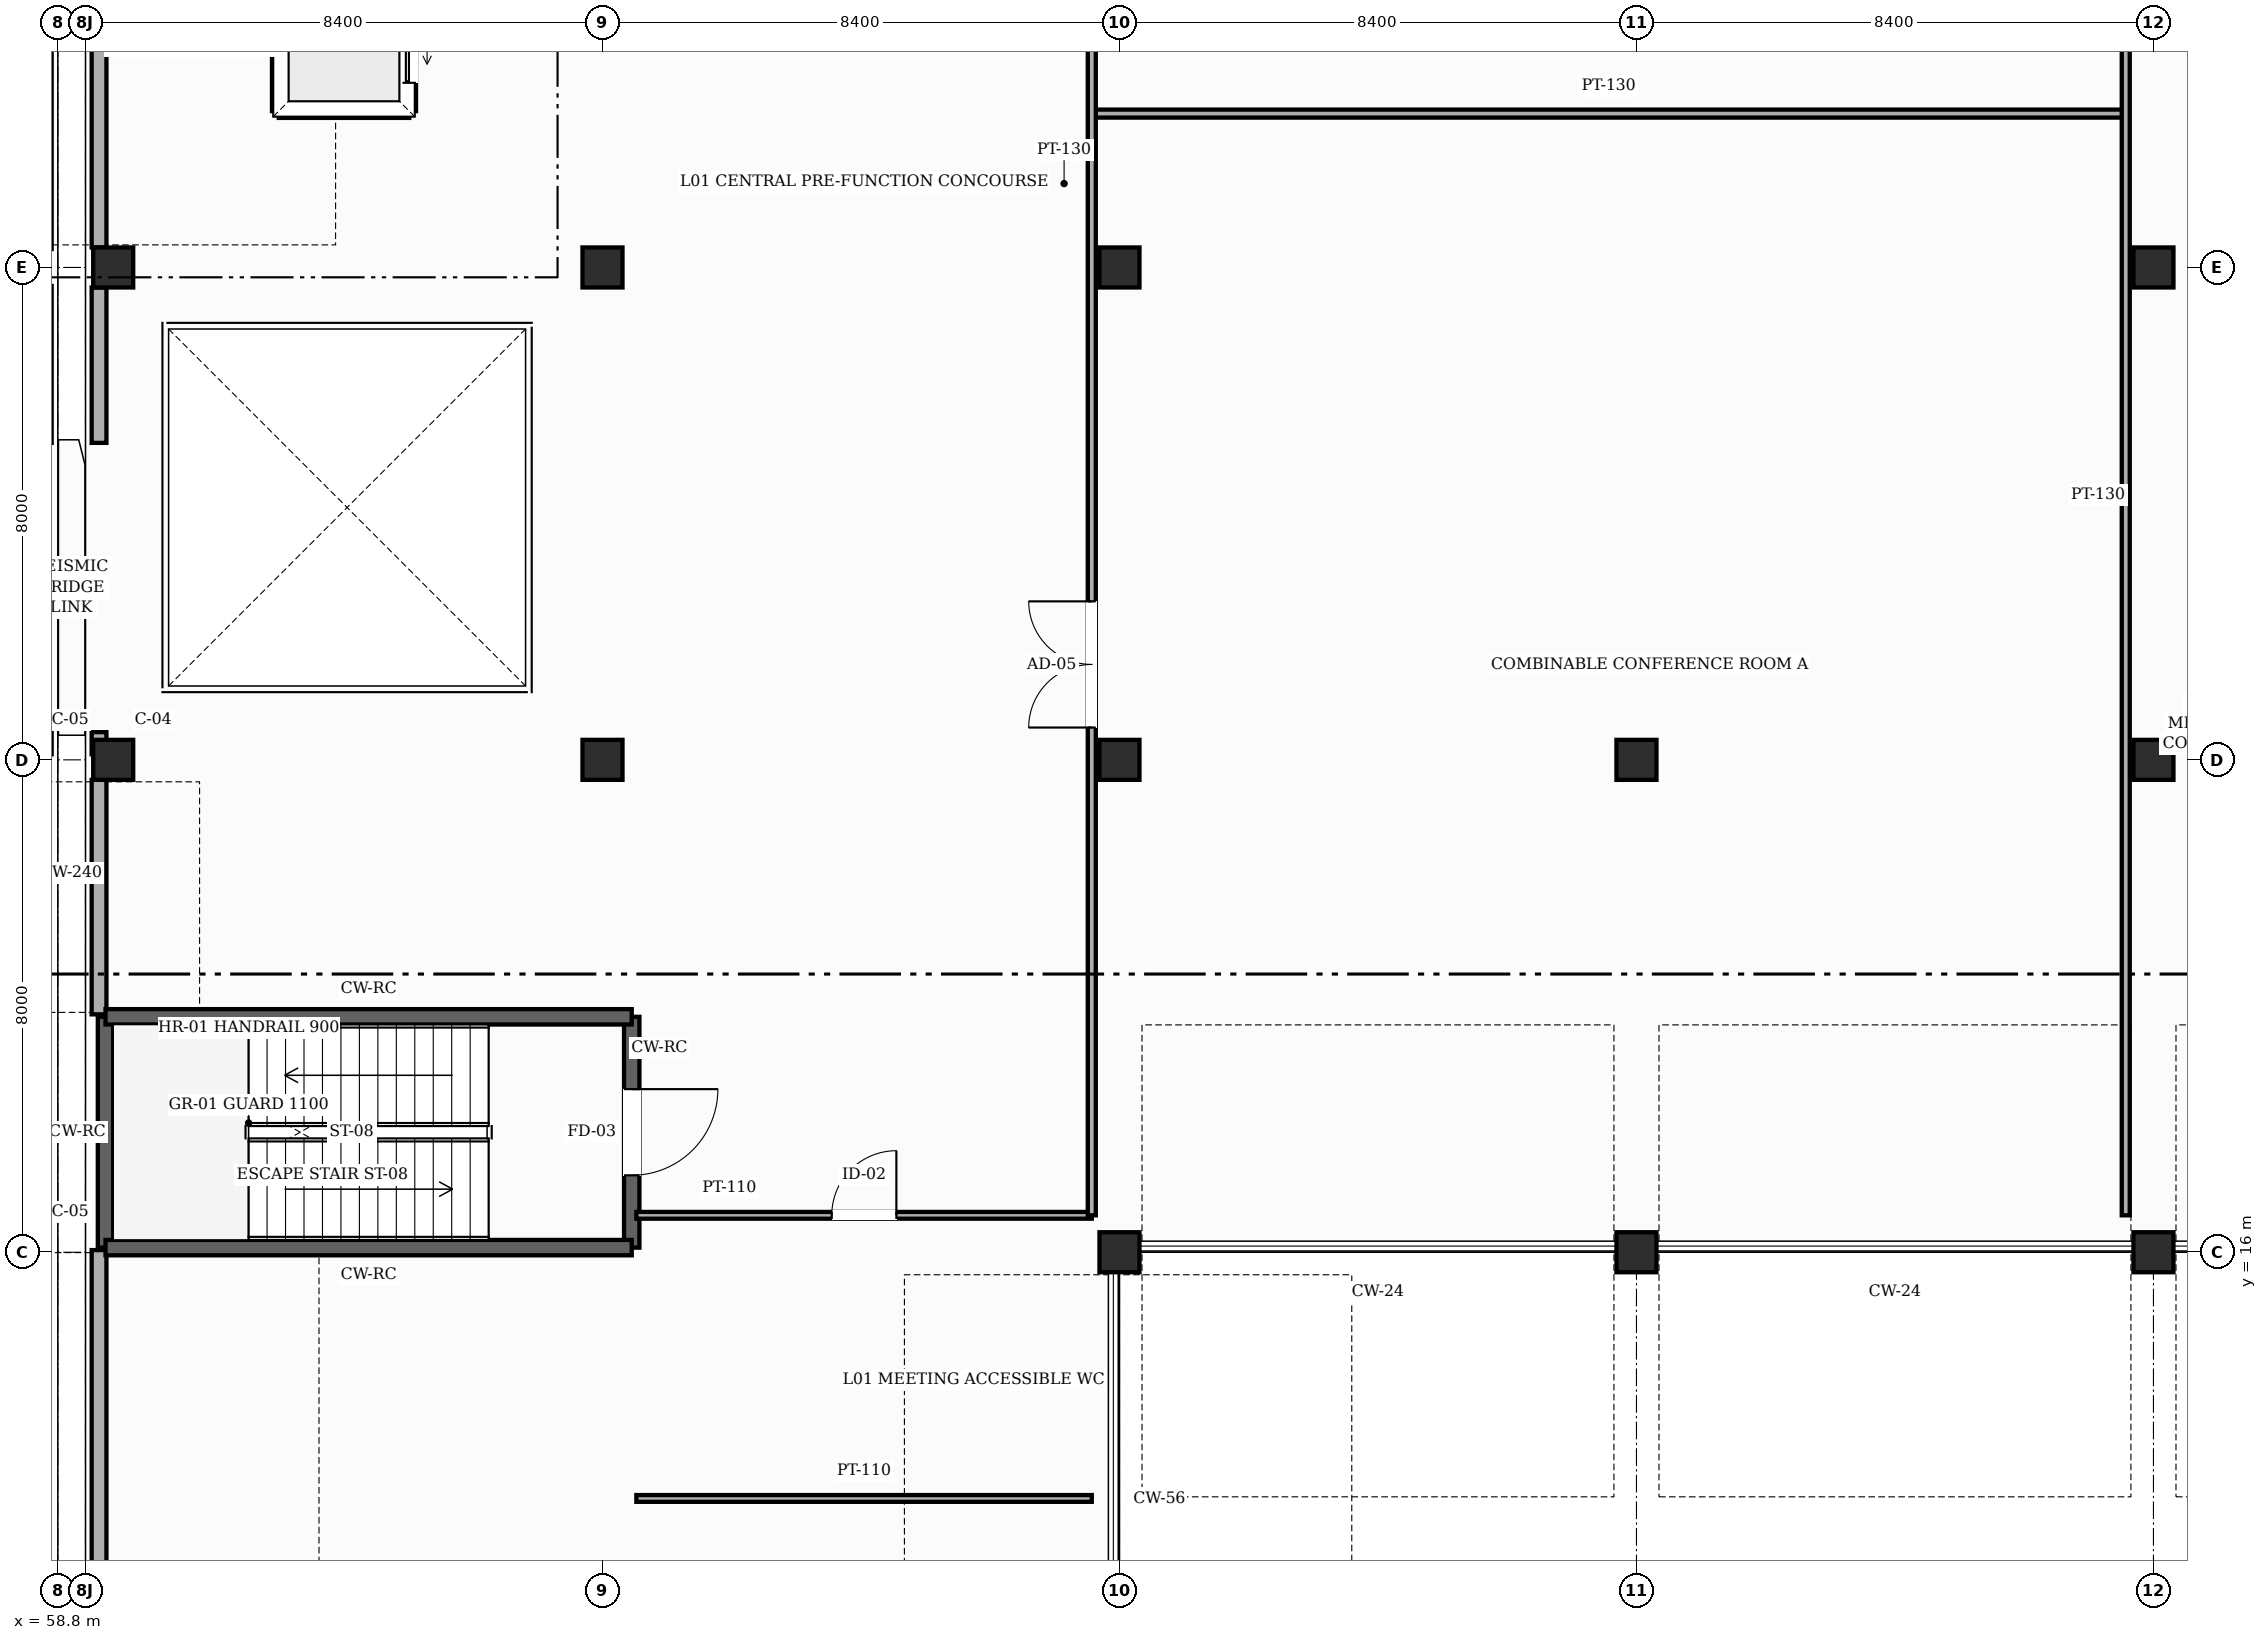
"""IFC4 building model, lengths in metres.
Left out: names, types, materials, properties, quantities, classifications, styles, units other than length and angle.
Written with IfcOpenShell. Run it as: python <this file> out.ifc"""

import sys

from ifc_helpers import new_model, si_unit, direction, frame, frame_2d, origin, origin_2d, place, context, subcontext, project, spatial, rectangle, hollow_rectangle, extrude, element, fill, save


model = new_model("IFC4")
c1 = context("Model", 3, precision=1e-05, world=origin(), true_north=direction((0.0, 1.0)))
c2 = subcontext(c1, "Body", "Model", "MODEL_VIEW")
j1 = project(units=[si_unit("LENGTHUNIT", "METRE"), si_unit("PLANEANGLEUNIT", "RADIAN")], contexts=[c1])
p1 = place(None, origin())
s1 = spatial("IfcSite", under=j1, at=p1, CompositionType="ELEMENT")
p2 = place(p1, origin())
s2 = spatial("IfcBuilding", under=s1, at=p2, CompositionType="ELEMENT")
p3 = place(p2, frame((0.0, 0.0, 5.4)))
s3 = spatial("IfcBuildingStorey", under=s2, at=p3, CompositionType="ELEMENT", Elevation=5.4)
for number, where, z_axis, x_axis in (
    (1, (59.7, 24.0, 0.0), (0.0, 0.0, 1.0), (1.0, 0.0, 0.0)),
    (2, (59.7, 32.0, 0.0), (0.0, 0.0, 1.0), (1.0, 0.0, 0.0)),
    (3, (67.65, 24.0, 0.0), (0.0, 0.0, 1.0), (1.0, 0.0, 0.0)),
    (4, (67.65, 32.0, 0.0), (0.0, 0.0, 1.0), (1.0, 0.0, 0.0)),
    (5, (76.05, 16.0, 0.0), (0.0, 0.0, 1.0), (1.0, 0.0, 0.0)),
    (6, (76.05, 24.0, 0.0), (0.0, 0.0, 1.0), (1.0, 0.0, 0.0)),
    (7, (76.05, 32.0, 0.0), (0.0, 0.0, 1.0), (1.0, 0.0, 0.0)),
    (8, (84.45, 16.0, 0.0), (0.0, 0.0, 1.0), (1.0, 0.0, 0.0)),
    (9, (84.45, 24.0, 0.0), (0.0, 0.0, 1.0), (1.0, 0.0, 0.0)),
    (10, (92.85, 16.0, 0.0), (0.0, 0.0, 1.0), (1.0, 0.0, 0.0)),
    (11, (92.85, 24.0, 0.0), (0.0, 0.0, 1.0), (1.0, 0.0, 0.0)),
    (12, (92.85, 32.0, 0.0), (0.0, 0.0, 1.0), (1.0, 0.0, 0.0)),
):
    element("IfcColumn", number, at=place(p3, frame(where, z_axis=z_axis, x_axis=x_axis)), inside=s3, PredefinedType="COLUMN", context=c2, shape_type="SweptSolid", body=[
        extrude(hollow_rectangle(XDim=0.65, YDim=0.65, WallThickness=0.025, InnerFilletRadius=0.025, OuterFilletRadius=0.05, at=origin_2d()), origin(), (0.0, 0.0, 1.0), 4.8),
    ])
p4 = place(p3, frame((58.58, 24.45, 0.0), z_axis=(0.0, 0.0, 1.0), x_axis=(0.0, -1.0, 0.0)))
e13 = element("IfcWall", 13, at=p4, inside=s3, PredefinedType="SOLIDWALL", context=c2, shape_type="SweptSolid", body=[
    extrude(rectangle(XDim=0.36, YDim=0.24, at=frame_2d((0.18, 0.0))), origin(), (0.0, 0.0, 1.0), 4.535),
])
p5 = place(p3, frame((58.58, 31.7, 0.0), z_axis=(0.0, 0.0, 1.0), x_axis=(0.0, -1.0, 0.0)))
e14 = element("IfcWall", 14, at=p5, inside=s3, PredefinedType="SOLIDWALL", context=c2, shape_type="SweptSolid", body=[
    extrude(rectangle(XDim=2.55, YDim=0.24, at=frame_2d((1.275, 0.0))), origin(), (0.0, 0.0, 1.0), 3.875),
])
p6 = place(p3, frame((58.58, 39.25, 0.0), z_axis=(0.0, 0.0, 1.0), x_axis=(0.0, -1.0, 0.0)))
e15 = element("IfcWall", 15, at=p6, inside=s3, PredefinedType="SOLIDWALL", context=c2, shape_type="SweptSolid", body=[
    extrude(rectangle(XDim=6.95, YDim=0.24, at=frame_2d((3.475, 0.0))), origin(), (0.0, 0.0, 1.0), 3.875),
])
p7 = place(p3, frame((59.47, 29.15, 0.0), z_axis=(0.0, 0.0, 1.0), x_axis=(0.0, 1.0, 0.0)))
e16 = element("IfcWall", 16, at=p7, inside=s3, PredefinedType="SOLIDWALL", context=c2, shape_type="SweptSolid", body=[
    extrude(rectangle(XDim=2.525, YDim=0.24, at=frame_2d((1.263, 0.0))), origin(), (0.0, 0.0, 1.0), 3.875),
])
p8 = place(p3, frame((59.47, 32.325, 0.0), z_axis=(0.0, 0.0, 1.0), x_axis=(0.0, 1.0, 0.0)))
e17 = element("IfcWall", 17, at=p8, inside=s3, PredefinedType="SOLIDWALL", context=c2, shape_type="SweptSolid", body=[
    extrude(rectangle(XDim=8.25, YDim=0.24, at=frame_2d((4.125, 0.0))), origin(), (0.0, 0.0, 1.0), 3.875),
])
p9 = place(p3, frame((59.47, 8.325, 0.0), z_axis=(0.0, 0.0, 1.0), x_axis=(0.0, 1.0, 0.0)))
e18 = element("IfcWall", 18, at=p9, inside=s3, PredefinedType="SOLIDWALL", context=c2, shape_type="SweptSolid", body=[
    extrude(rectangle(XDim=7.71, YDim=0.24, at=frame_2d((3.855, 0.0))), origin(), (0.0, 0.0, 1.0), 4.535),
])
p10 = place(p3, frame((59.47, 19.865, 0.0), z_axis=(0.0, 0.0, 1.0), x_axis=(0.0, 1.0, 0.0)))
e19 = element("IfcWall", 19, at=p10, inside=s3, PredefinedType="SOLIDWALL", context=c2, shape_type="SweptSolid", body=[
    extrude(rectangle(XDim=3.81, YDim=0.24, at=frame_2d((1.905, 0.0))), origin(), (0.0, 0.0, 1.0), 4.535),
])
p11 = place(p3, frame((59.47, 24.09, 0.0), z_axis=(0.0, 0.0, 1.0), x_axis=(0.0, 1.0, 0.0)))
e20 = element("IfcWall", 20, at=p11, inside=s3, PredefinedType="SOLIDWALL", context=c2, shape_type="SweptSolid", body=[
    extrude(rectangle(XDim=0.36, YDim=0.24, at=frame_2d((0.18, 0.0))), origin(), (0.0, 0.0, 1.0), 4.535),
])
p12 = place(p3, frame((68.125, 19.825, 0.0), z_axis=(0.0, 0.0, 1.0), x_axis=(0.0, -1.0, 0.0)))
e21 = element("IfcWall", 21, at=p12, inside=s3, PredefinedType="SHEAR", context=c2, shape_type="SweptSolid", body=[
    extrude(rectangle(XDim=3.75, YDim=0.25, at=frame_2d((1.875, 0.0))), origin(), (0.0, 0.0, 1.0), 4.55),
])
p13 = place(p12, frame((1.175, 0.0, 0.0)))
e22 = element("IfcOpeningElement", 22, at=p13, cuts=e21, PredefinedType="OPENING", context=c2, shape_type="SweptSolid", body=[
    extrude(rectangle(XDim=1.4, YDim=2.25, at=frame_2d((0.7, 1.125))), frame((0.0, 0.135, 0.0), z_axis=(0.0, -1.0, 0.0), x_axis=(1.0, 0.0, 0.0)), (0.0, 0.0, 1.0), 0.27),
])
p14 = place(p3, frame((59.575, 16.075, 0.0), z_axis=(0.0, 0.0, 1.0), x_axis=(0.0, 1.0, 0.0)))
e23 = element("IfcWall", 23, at=p14, inside=s3, PredefinedType="SHEAR", context=c2, shape_type="SweptSolid", body=[
    extrude(rectangle(XDim=3.75, YDim=0.25, at=frame_2d((1.875, 0.0))), origin(), (0.0, 0.0, 1.0), 4.55),
])
for number, where, z_axis, x_axis in (
    (24, (59.575, 19.825, 0.0), (0.0, 0.0, 1.0), (1.0, 0.0, 0.0)),
    (25, (68.125, 16.075, 0.0), (0.0, 0.0, 1.0), (-1.0, 0.0, 0.0)),
):
    element("IfcWall", number, at=place(p3, frame(where, z_axis=z_axis, x_axis=x_axis)), inside=s3, PredefinedType="SHEAR", context=c2, shape_type="SweptSolid", body=[
        extrude(rectangle(XDim=8.55, YDim=0.25, at=frame_2d((4.275, 0.0))), origin(), (0.0, 0.0, 1.0), 4.55),
    ])
p15 = place(p3, frame((62.39, 34.54, 0.0), z_axis=(0.0, 0.0, 1.0), x_axis=(1.0, 0.0, 0.0)))
e26 = element("IfcWall", 26, at=p15, inside=s3, PredefinedType="SHEAR", context=c2, shape_type="SweptSolid", body=[
    extrude(rectangle(XDim=2.12, YDim=0.22, at=frame_2d((1.06, 0.0))), origin(), (0.0, 0.0, 1.0), 4.55),
])
p16 = place(p3, frame((64.51, 34.54, 0.0), z_axis=(0.0, 0.0, 1.0), x_axis=(0.0, 1.0, 0.0)))
e27 = element("IfcWall", 27, at=p16, inside=s3, PredefinedType="SHEAR", context=c2, shape_type="SweptSolid", body=[
    extrude(rectangle(XDim=2.12, YDim=0.22, at=frame_2d((1.06, 0.0))), origin(), (0.0, 0.0, 1.0), 4.55),
])
p17 = place(p16, frame((0.46, 0.0, 0.0)))
e28 = element("IfcOpeningElement", 28, at=p17, cuts=e27, PredefinedType="OPENING", context=c2, shape_type="SweptSolid", body=[
    extrude(rectangle(XDim=1.2, YDim=2.25, at=frame_2d((0.6, 1.125))), frame((0.0, 0.12, 0.0), z_axis=(0.0, -1.0, 0.0), x_axis=(1.0, 0.0, 0.0)), (0.0, 0.0, 1.0), 0.24),
])
p18 = place(p3, frame((62.39, 34.54, 0.0), z_axis=(0.0, 0.0, 1.0), x_axis=(0.0, 1.0, 0.0)))
e29 = element("IfcWall", 29, at=p18, inside=s3, PredefinedType="SHEAR", context=c2, shape_type="SweptSolid", body=[
    extrude(rectangle(XDim=2.12, YDim=0.22, at=frame_2d((1.06, 0.0))), origin(), (0.0, 0.0, 1.0), 4.55),
])
p19 = place(p3, frame((68.2, 12.0, 0.0), z_axis=(0.0, 0.0, 1.0), x_axis=(1.0, 0.0, 0.0)))
e30 = element("IfcWall", 30, at=p19, inside=s3, PredefinedType="PARTITIONING", context=c2, shape_type="SweptSolid", body=[
    extrude(rectangle(XDim=7.4, YDim=0.11, at=frame_2d((3.7, 0.0))), origin(), (0.0, 0.0, 1.0), 4.535),
])
p20 = place(p3, frame((68.2, 16.6, 0.0), z_axis=(0.0, 0.0, 1.0), x_axis=(1.0, 0.0, 0.0)))
e31 = element("IfcWall", 31, at=p20, inside=s3, PredefinedType="PARTITIONING", context=c2, shape_type="SweptSolid", body=[
    extrude(rectangle(XDim=7.4, YDim=0.11, at=frame_2d((3.7, 0.0))), origin(), (0.0, 0.0, 1.0), 4.535),
])
p21 = place(p20, frame((3.175, 0.0, 0.0)))
e32 = element("IfcOpeningElement", 32, at=p21, cuts=e31, PredefinedType="OPENING", context=c2, shape_type="SweptSolid", body=[
    extrude(rectangle(XDim=1.05, YDim=2.2, at=frame_2d((0.525, 1.1))), frame((0.0, 0.065, 0.0), z_axis=(0.0, -1.0, 0.0), x_axis=(1.0, 0.0, 0.0)), (0.0, 0.0, 1.0), 0.13),
])
p22 = place(p3, frame((75.6, 34.5, 0.0), z_axis=(0.0, 0.0, 1.0), x_axis=(1.0, 0.0, 0.0)))
e33 = element("IfcWall", 33, at=p22, inside=s3, PredefinedType="PARTITIONING", context=c2, shape_type="SweptSolid", body=[
    extrude(rectangle(XDim=16.8, YDim=0.13, at=frame_2d((8.4, 0.0))), origin(), (0.0, 0.0, 1.0), 4.535),
])
p23 = place(p3, frame((75.6, 16.6, 0.0), z_axis=(0.0, 0.0, 1.0), x_axis=(0.0, 1.0, 0.0)))
e34 = element("IfcWall", 34, at=p23, inside=s3, PredefinedType="PARTITIONING", context=c2, shape_type="SweptSolid", body=[
    extrude(rectangle(XDim=35.8, YDim=0.13, at=frame_2d((17.9, 0.0))), origin(), (0.0, 0.0, 1.0), 4.535),
])
p24 = place(p23, frame((7.925, 0.0, 0.0)))
e35 = element("IfcOpeningElement", 35, at=p24, cuts=e34, PredefinedType="OPENING", context=c2, shape_type="SweptSolid", body=[
    extrude(rectangle(XDim=2.05, YDim=2.45, at=frame_2d((1.025, 1.225))), frame((0.0, 0.075, 0.0), z_axis=(0.0, -1.0, 0.0), x_axis=(1.0, 0.0, 0.0)), (0.0, 0.0, 1.0), 0.15),
])
p25 = place(p23, frame((25.925, 0.0, 0.0)))
e36 = element("IfcOpeningElement", 36, at=p25, cuts=e34, PredefinedType="OPENING", context=c2, shape_type="SweptSolid", body=[
    extrude(rectangle(XDim=1.85, YDim=2.4, at=frame_2d((0.925, 1.2))), frame((0.0, 0.075, 0.0), z_axis=(0.0, -1.0, 0.0), x_axis=(1.0, 0.0, 0.0)), (0.0, 0.0, 1.0), 0.15),
])
p26 = place(p3, frame((92.4, 16.6, 0.0), z_axis=(0.0, 0.0, 1.0), x_axis=(0.0, 1.0, 0.0)))
e37 = element("IfcWall", 37, at=p26, inside=s3, PredefinedType="PARTITIONING", context=c2, shape_type="SweptSolid", body=[
    extrude(rectangle(XDim=35.8, YDim=0.13, at=frame_2d((17.9, 0.0))), origin(), (0.0, 0.0, 1.0), 4.535),
])
p27 = place(p13, origin())
e38 = element("IfcDoor", 38, at=p27, inside=s3, OperationType="SINGLE_SWING_LEFT", PredefinedType="DOOR", context=c2, shape_type="SweptSolid", body=[
    extrude(rectangle(XDim=1.4, YDim=2.25, at=frame_2d((0.7, 1.125))), frame((0.0, 0.025, 0.0), z_axis=(0.0, -1.0, 0.0), x_axis=(1.0, 0.0, 0.0)), (0.0, 0.0, 1.0), 0.05),
])
fill(e22, e38)
p28 = place(p17, origin())
e39 = element("IfcDoor", 39, at=p28, inside=s3, OperationType="SLIDING_TO_LEFT", PredefinedType="DOOR", context=c2, shape_type="SweptSolid", body=[
    extrude(rectangle(XDim=1.2, YDim=2.25, at=frame_2d((0.6, 1.125))), frame((0.0, 0.025, 0.0), z_axis=(0.0, -1.0, 0.0), x_axis=(1.0, 0.0, 0.0)), (0.0, 0.0, 1.0), 0.05),
])
fill(e28, e39)
p29 = place(p24, origin())
e40 = element("IfcDoor", 40, at=p29, inside=s3, OperationType="DOUBLE_DOOR_SINGLE_SWING", PredefinedType="DOOR", context=c2, shape_type="SweptSolid", body=[
    extrude(rectangle(XDim=2.05, YDim=2.45, at=frame_2d((1.025, 1.225))), frame((0.0, 0.025, 0.0), z_axis=(0.0, -1.0, 0.0), x_axis=(1.0, 0.0, 0.0)), (0.0, 0.0, 1.0), 0.05),
])
fill(e35, e40)
p30 = place(p21, origin())
e41 = element("IfcDoor", 41, at=p30, inside=s3, OperationType="SINGLE_SWING_RIGHT", PredefinedType="DOOR", context=c2, shape_type="SweptSolid", body=[
    extrude(rectangle(XDim=1.05, YDim=2.2, at=frame_2d((0.525, 1.1))), frame((0.0, 0.025, 0.0), z_axis=(0.0, -1.0, 0.0), x_axis=(1.0, 0.0, 0.0)), (0.0, 0.0, 1.0), 0.05),
])
fill(e32, e41)
save(model, sys.argv[1])
